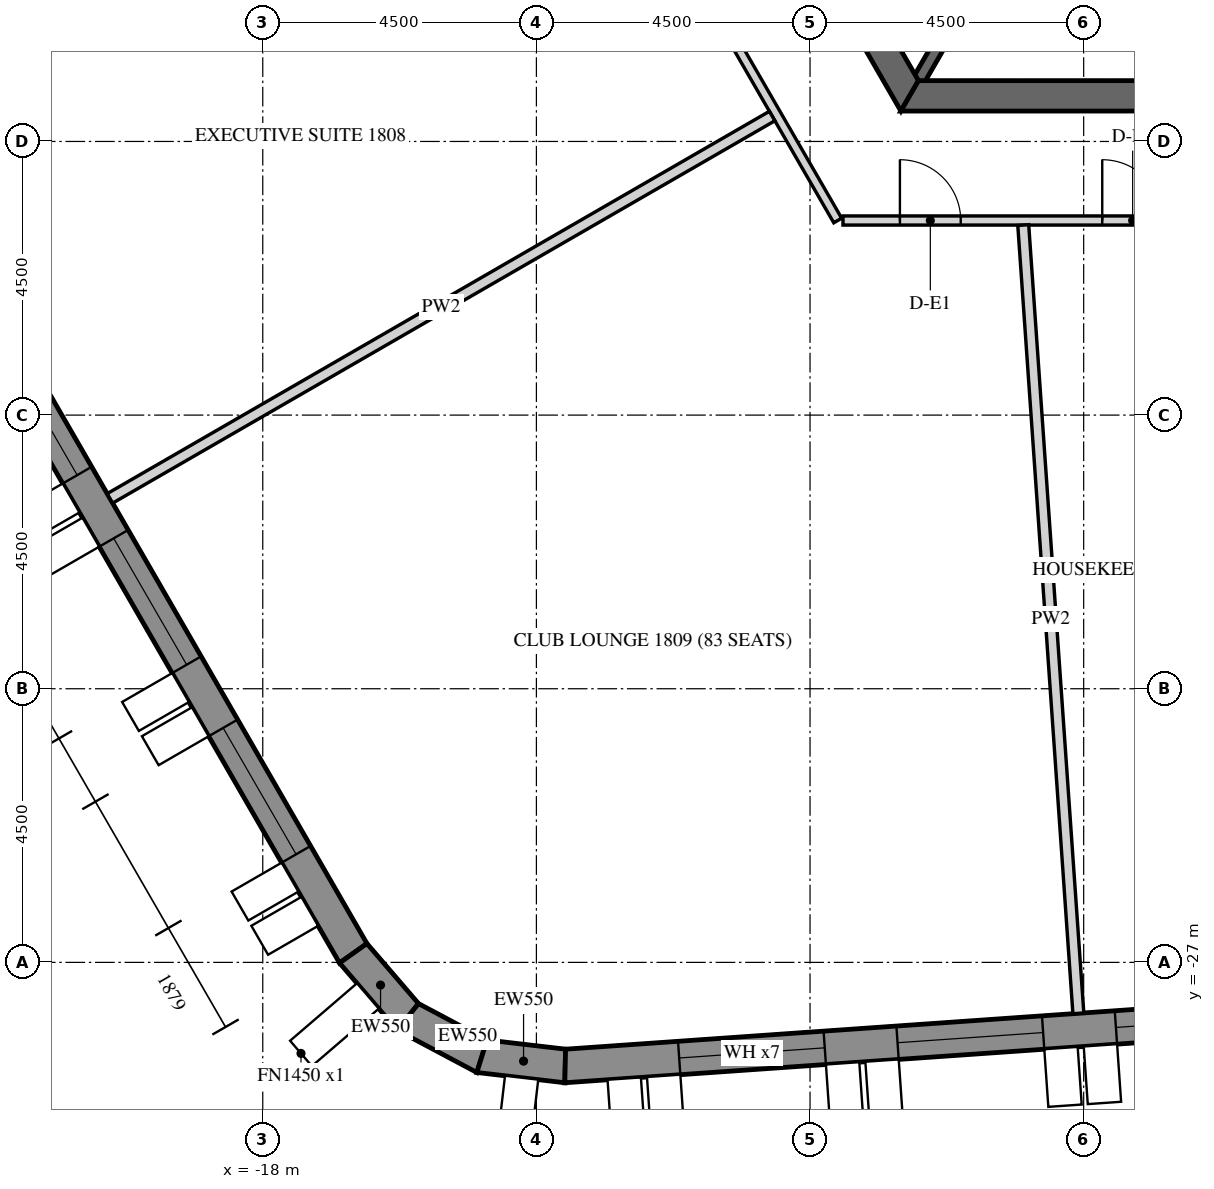
"""IFC4 building model, lengths in metres.
Left out: names, types, materials, properties, quantities, classifications, styles, units other than length and angle.
Written with IfcOpenShell. Run it as: python <this file> out.ifc"""

import sys

from ifc_helpers import new_model, si_unit, direction, frame, frame_2d, origin, place, context, subcontext, project, spatial, polyline, rectangle, outline, extrude, element, fill, save


model = new_model("IFC4")
c1 = context("Model", 3, precision=1e-05, world=origin(), true_north=direction((0.0, 1.0)))
c2 = subcontext(c1, "Body", "Model", "MODEL_VIEW")
j1 = project(units=[si_unit("LENGTHUNIT", "METRE"), si_unit("PLANEANGLEUNIT", "RADIAN")], contexts=[c1])
p1 = place(None, origin())
s1 = spatial("IfcSite", under=j1, at=p1, CompositionType="ELEMENT")
p2 = place(p1, origin())
s2 = spatial("IfcBuilding", under=s1, at=p2, CompositionType="ELEMENT")
p3 = place(p2, frame((0.0, 0.0, 226.8)))
s3 = spatial("IfcBuildingStorey", under=s2, at=p3, CompositionType="ELEMENT", Elevation=226.8)
p4 = place(p3, frame((-30.391, -2.811, -0.15), z_axis=(0.0, 0.0, 1.0), x_axis=(0.499998569178, -0.866026229868, 0.0)))
e1 = element("IfcWall", 1, at=p4, inside=s3, PredefinedType="SOLIDWALL", context=c2, shape_type="SweptSolid", body=[
    extrude(outline(polyline([(-0.022, -0.275), (27.783, -0.275), (27.732, 0.275), (0.022, 0.275), (-0.022, -0.275)])), origin(), (0.0, 0.0, 1.0), 3.9),
])
p5 = place(p4, frame((1.879, 0.0, 1.05)))
e2 = element("IfcOpeningElement", 2, at=p5, cuts=e1, PredefinedType="OPENING", context=c2, shape_type="SweptSolid", body=[
    extrude(rectangle(XDim=2.4, YDim=2.4, at=frame_2d((1.2, 1.2))), frame((0.0, 0.285, 0.0), z_axis=(0.0, -1.0, 0.0), x_axis=(1.0, 0.0, 0.0)), (0.0, 0.0, 1.0), 0.57),
])
p6 = place(p4, frame((5.479, 0.0, 1.05)))
e3 = element("IfcOpeningElement", 3, at=p6, cuts=e1, PredefinedType="OPENING", context=c2, shape_type="SweptSolid", body=[
    extrude(rectangle(XDim=2.4, YDim=2.4, at=frame_2d((1.2, 1.2))), frame((0.0, 0.285, 0.0), z_axis=(0.0, -1.0, 0.0), x_axis=(1.0, 0.0, 0.0)), (0.0, 0.0, 1.0), 0.57),
])
p7 = place(p4, frame((9.079, 0.0, 1.05)))
e4 = element("IfcOpeningElement", 4, at=p7, cuts=e1, PredefinedType="OPENING", context=c2, shape_type="SweptSolid", body=[
    extrude(rectangle(XDim=2.4, YDim=2.4, at=frame_2d((1.2, 1.2))), frame((0.0, 0.285, 0.0), z_axis=(0.0, -1.0, 0.0), x_axis=(1.0, 0.0, 0.0)), (0.0, 0.0, 1.0), 0.57),
])
p8 = place(p4, frame((12.679, 0.0, 1.05)))
e5 = element("IfcOpeningElement", 5, at=p8, cuts=e1, PredefinedType="OPENING", context=c2, shape_type="SweptSolid", body=[
    extrude(rectangle(XDim=2.4, YDim=2.4, at=frame_2d((1.2, 1.2))), frame((0.0, 0.285, 0.0), z_axis=(0.0, -1.0, 0.0), x_axis=(1.0, 0.0, 0.0)), (0.0, 0.0, 1.0), 0.57),
])
p9 = place(p4, frame((16.279, 0.0, 1.05)))
e6 = element("IfcOpeningElement", 6, at=p9, cuts=e1, PredefinedType="OPENING", context=c2, shape_type="SweptSolid", body=[
    extrude(rectangle(XDim=2.4, YDim=2.4, at=frame_2d((1.2, 1.2))), frame((0.0, 0.285, 0.0), z_axis=(0.0, -1.0, 0.0), x_axis=(1.0, 0.0, 0.0)), (0.0, 0.0, 1.0), 0.57),
])
p10 = place(p4, frame((19.879, 0.0, 1.05)))
e7 = element("IfcOpeningElement", 7, at=p10, cuts=e1, PredefinedType="OPENING", context=c2, shape_type="SweptSolid", body=[
    extrude(rectangle(XDim=2.4, YDim=2.4, at=frame_2d((1.2, 1.2))), frame((0.0, 0.285, 0.0), z_axis=(0.0, -1.0, 0.0), x_axis=(1.0, 0.0, 0.0)), (0.0, 0.0, 1.0), 0.57),
])
p11 = place(p4, frame((23.479, 0.0, 1.05)))
e8 = element("IfcOpeningElement", 8, at=p11, cuts=e1, PredefinedType="OPENING", context=c2, shape_type="SweptSolid", body=[
    extrude(rectangle(XDim=2.4, YDim=2.4, at=frame_2d((1.2, 1.2))), frame((0.0, 0.285, 0.0), z_axis=(0.0, -1.0, 0.0), x_axis=(1.0, 0.0, 0.0)), (0.0, 0.0, 1.0), 0.57),
])
p12 = place(p3, frame((-16.512, -26.85, -0.15), z_axis=(0.0, 0.0, 1.0), x_axis=(0.651621950847, -0.758543890078, 0.0)))
e9 = element("IfcWall", 9, at=p12, inside=s3, PredefinedType="SOLIDWALL", context=c2, shape_type="SweptSolid", body=[
    extrude(outline(polyline([(-0.026, -0.275), (1.431, -0.275), (1.327, 0.275), (0.026, 0.275), (-0.026, -0.275)])), origin(), (0.0, 0.0, 1.0), 3.9),
])
p13 = place(p3, frame((-15.614, -27.896, -0.15), z_axis=(0.0, 0.0, 1.0), x_axis=(0.882994189209, -0.469383917304, 0.0)))
e10 = element("IfcWall", 10, at=p13, inside=s3, PredefinedType="SOLIDWALL", context=c2, shape_type="SweptSolid", body=[
    extrude(outline(polyline([(-0.052, -0.275), (1.431, -0.275), (1.327, 0.275), (0.052, 0.275), (-0.052, -0.275)])), origin(), (0.0, 0.0, 1.0), 3.9),
])
p14 = place(p3, frame((-14.396, -28.543, -0.15), z_axis=(0.0, 0.0, 1.0), x_axis=(0.993232537394, -0.11614269956, 0.0)))
e11 = element("IfcWall", 11, at=p14, inside=s3, PredefinedType="SOLIDWALL", context=c2, shape_type="SweptSolid", body=[
    extrude(outline(polyline([(-0.052, -0.275), (1.405, -0.275), (1.353, 0.275), (0.052, 0.275), (-0.052, -0.275)])), origin(), (0.0, 0.0, 1.0), 3.9),
])
p15 = place(p3, frame((-13.026, -28.704, -0.15), z_axis=(0.0, 0.0, 1.0), x_axis=(0.99756406806, 0.069756219185, 0.0)))
e12 = element("IfcWall", 12, at=p15, inside=s3, PredefinedType="SOLIDWALL", context=c2, shape_type="SweptSolid", body=[
    extrude(outline(polyline([(-0.026, -0.275), (27.78, -0.275), (27.735, 0.275), (0.026, 0.275), (-0.026, -0.275)])), origin(), (0.0, 0.0, 1.0), 3.9),
])
p16 = place(p15, frame((1.879, 0.0, 1.05)))
e13 = element("IfcOpeningElement", 13, at=p16, cuts=e12, PredefinedType="OPENING", context=c2, shape_type="SweptSolid", body=[
    extrude(rectangle(XDim=2.4, YDim=2.4, at=frame_2d((1.2, 1.2))), frame((0.0, 0.285, 0.0), z_axis=(0.0, -1.0, 0.0), x_axis=(1.0, 0.0, 0.0)), (0.0, 0.0, 1.0), 0.57),
])
p17 = place(p15, frame((5.479, 0.0, 1.05)))
e14 = element("IfcOpeningElement", 14, at=p17, cuts=e12, PredefinedType="OPENING", context=c2, shape_type="SweptSolid", body=[
    extrude(rectangle(XDim=2.4, YDim=2.4, at=frame_2d((1.2, 1.2))), frame((0.0, 0.285, 0.0), z_axis=(0.0, -1.0, 0.0), x_axis=(1.0, 0.0, 0.0)), (0.0, 0.0, 1.0), 0.57),
])
p18 = place(p15, frame((9.079, 0.0, 1.05)))
e15 = element("IfcOpeningElement", 15, at=p18, cuts=e12, PredefinedType="OPENING", context=c2, shape_type="SweptSolid", body=[
    extrude(rectangle(XDim=2.4, YDim=2.4, at=frame_2d((1.2, 1.2))), frame((0.0, 0.285, 0.0), z_axis=(0.0, -1.0, 0.0), x_axis=(1.0, 0.0, 0.0)), (0.0, 0.0, 1.0), 0.57),
])
p19 = place(p15, frame((12.679, 0.0, 1.05)))
e16 = element("IfcOpeningElement", 16, at=p19, cuts=e12, PredefinedType="OPENING", context=c2, shape_type="SweptSolid", body=[
    extrude(rectangle(XDim=2.4, YDim=2.4, at=frame_2d((1.2, 1.2))), frame((0.0, 0.285, 0.0), z_axis=(0.0, -1.0, 0.0), x_axis=(1.0, 0.0, 0.0)), (0.0, 0.0, 1.0), 0.57),
])
p20 = place(p15, frame((16.279, 0.0, 1.05)))
e17 = element("IfcOpeningElement", 17, at=p20, cuts=e12, PredefinedType="OPENING", context=c2, shape_type="SweptSolid", body=[
    extrude(rectangle(XDim=2.4, YDim=2.4, at=frame_2d((1.2, 1.2))), frame((0.0, 0.285, 0.0), z_axis=(0.0, -1.0, 0.0), x_axis=(1.0, 0.0, 0.0)), (0.0, 0.0, 1.0), 0.57),
])
p21 = place(p15, frame((19.879, 0.0, 1.05)))
e18 = element("IfcOpeningElement", 18, at=p21, cuts=e12, PredefinedType="OPENING", context=c2, shape_type="SweptSolid", body=[
    extrude(rectangle(XDim=2.4, YDim=2.4, at=frame_2d((1.2, 1.2))), frame((0.0, 0.285, 0.0), z_axis=(0.0, -1.0, 0.0), x_axis=(1.0, 0.0, 0.0)), (0.0, 0.0, 1.0), 0.57),
])
p22 = place(p15, frame((23.479, 0.0, 1.05)))
e19 = element("IfcOpeningElement", 19, at=p22, cuts=e12, PredefinedType="OPENING", context=c2, shape_type="SweptSolid", body=[
    extrude(rectangle(XDim=2.4, YDim=2.4, at=frame_2d((1.2, 1.2))), frame((0.0, 0.285, 0.0), z_axis=(0.0, -1.0, 0.0), x_axis=(1.0, 0.0, 0.0)), (0.0, 0.0, 1.0), 0.57),
])
p23 = place(p3, frame((-14.722, 0.0, -0.15), z_axis=(0.0, 0.0, 1.0), x_axis=(0.50000571537, -0.866022103989, 0.0)))
e20 = element("IfcWall", 20, at=p23, inside=s3, PredefinedType="SHEAR", context=c2, shape_type="SweptSolid", body=[
    extrude(outline(polyline([(-0.144, -0.25), (14.867, -0.25), (14.578, 0.25), (0.144, 0.25), (-0.144, -0.25)])), origin(), (0.0, 0.0, 1.0), 3.9),
])
p24 = place(p23, frame((6.432, 0.0, 0.15)))
e21 = element("IfcOpeningElement", 21, at=p24, cuts=e20, PredefinedType="OPENING", context=c2, shape_type="SweptSolid", body=[
    extrude(rectangle(XDim=1.8, YDim=2.4, at=frame_2d((0.9, 1.2))), frame((0.0, 0.26, 0.0), z_axis=(0.0, -1.0, 0.0), x_axis=(1.0, 0.0, 0.0)), (0.0, 0.0, 1.0), 0.52),
])
p25 = place(p3, frame((-7.361, -12.75, -0.15), z_axis=(0.0, 0.0, 1.0), x_axis=(1.0, 0.0, 0.0)))
e22 = element("IfcWall", 22, at=p25, inside=s3, PredefinedType="SHEAR", context=c2, shape_type="SweptSolid", body=[
    extrude(outline(polyline([(-0.144, -0.25), (14.866, -0.25), (14.578, 0.25), (0.144, 0.25), (-0.144, -0.25)])), origin(), (0.0, 0.0, 1.0), 3.9),
])
p26 = place(p25, frame((6.761, 0.0, 0.15)))
e23 = element("IfcOpeningElement", 23, at=p26, cuts=e22, PredefinedType="OPENING", context=c2, shape_type="SweptSolid", body=[
    extrude(rectangle(XDim=1.2, YDim=2.4, at=frame_2d((0.6, 1.2))), frame((0.0, 0.26, 0.0), z_axis=(0.0, -1.0, 0.0), x_axis=(1.0, 0.0, 0.0)), (0.0, 0.0, 1.0), 0.52),
])
p27 = place(p3, frame((-5.773, -10.0, -0.15), z_axis=(0.0, 0.0, 1.0), x_axis=(-0.499995765644, -0.866027848477, 0.0)))
e24 = element("IfcWall", 24, at=p27, inside=s3, PredefinedType="SHEAR", context=c2, shape_type="SweptSolid", body=[
    extrude(rectangle(XDim=2.887, YDim=0.2, at=frame_2d((1.443, 0.0))), origin(), (0.0, 0.0, 1.0), 3.9),
])
p28 = place(p3, frame((-15.863, -2.125, 0.0), z_axis=(0.0, 0.0, 1.0), x_axis=(0.500008833422, -0.866020303746, 0.0)))
e25 = element("IfcWall", 25, at=p28, inside=s3, PredefinedType="PARTITIONING", context=c2, shape_type="SweptSolid", body=[
    extrude(rectangle(XDim=14.636, YDim=0.15, at=frame_2d((7.318, 0.0))), origin(), (0.0, 0.0, 1.0), 2.988),
])
p29 = place(p28, frame((0.861, 0.0, 0.0)))
e26 = element("IfcOpeningElement", 26, at=p29, cuts=e25, PredefinedType="OPENING", context=c2, shape_type="SweptSolid", body=[
    extrude(rectangle(XDim=1.0, YDim=2.1, at=frame_2d((0.5, 1.05))), frame((0.0, 0.085, 0.0), z_axis=(0.0, -1.0, 0.0), x_axis=(1.0, 0.0, 0.0)), (0.0, 0.0, 1.0), 0.17),
])
p30 = place(p28, frame((9.909, 0.0, 0.0)))
e27 = element("IfcOpeningElement", 27, at=p30, cuts=e25, PredefinedType="OPENING", context=c2, shape_type="SweptSolid", body=[
    extrude(rectangle(XDim=1.0, YDim=2.1, at=frame_2d((0.5, 1.05))), frame((0.0, 0.085, 0.0), z_axis=(0.0, -1.0, 0.0), x_axis=(1.0, 0.0, 0.0)), (0.0, 0.0, 1.0), 0.17),
])
p31 = place(p3, frame((-8.458, -14.8, 0.0), z_axis=(0.0, 0.0, 1.0), x_axis=(1.0, 0.0, 0.0)))
e28 = element("IfcWall", 28, at=p31, inside=s3, PredefinedType="PARTITIONING", context=c2, shape_type="SweptSolid", body=[
    extrude(rectangle(XDim=14.636, YDim=0.15, at=frame_2d((7.318, 0.0))), origin(), (0.0, 0.0, 1.0), 2.988),
])
p32 = place(p31, frame((0.936, 0.0, 0.0)))
e29 = element("IfcOpeningElement", 29, at=p32, cuts=e28, PredefinedType="OPENING", context=c2, shape_type="SweptSolid", body=[
    extrude(rectangle(XDim=1.0, YDim=2.1, at=frame_2d((0.5, 1.05))), frame((0.0, 0.085, 0.0), z_axis=(0.0, -1.0, 0.0), x_axis=(1.0, 0.0, 0.0)), (0.0, 0.0, 1.0), 0.17),
])
p33 = place(p31, frame((4.264, 0.0, 0.0)))
e30 = element("IfcOpeningElement", 30, at=p33, cuts=e28, PredefinedType="OPENING", context=c2, shape_type="SweptSolid", body=[
    extrude(rectangle(XDim=1.0, YDim=2.1, at=frame_2d((0.5, 1.05))), frame((0.0, 0.085, 0.0), z_axis=(0.0, -1.0, 0.0), x_axis=(1.0, 0.0, 0.0)), (0.0, 0.0, 1.0), 0.17),
])
p34 = place(p31, frame((7.872, 0.0, 0.0)))
e31 = element("IfcOpeningElement", 31, at=p34, cuts=e28, PredefinedType="OPENING", context=c2, shape_type="SweptSolid", body=[
    extrude(rectangle(XDim=1.0, YDim=2.1, at=frame_2d((0.5, 1.05))), frame((0.0, 0.085, 0.0), z_axis=(0.0, -1.0, 0.0), x_axis=(1.0, 0.0, 0.0)), (0.0, 0.0, 1.0), 0.17),
])
p35 = place(p31, frame((11.481, 0.0, 0.0)))
e32 = element("IfcOpeningElement", 32, at=p35, cuts=e28, PredefinedType="OPENING", context=c2, shape_type="SweptSolid", body=[
    extrude(rectangle(XDim=1.0, YDim=2.1, at=frame_2d((0.5, 1.05))), frame((0.0, 0.085, 0.0), z_axis=(0.0, -1.0, 0.0), x_axis=(1.0, 0.0, 0.0)), (0.0, 0.0, 1.0), 0.17),
])
p36 = place(p3, frame((-24.114, -13.134, 0.0), z_axis=(0.0, 0.0, 1.0), x_axis=(0.866024255907, 0.500001988177, 0.0)))
e33 = element("IfcWall", 33, at=p36, inside=s3, PredefinedType="PARTITIONING", context=c2, shape_type="SweptSolid", body=[
    extrude(rectangle(XDim=12.575, YDim=0.18, at=frame_2d((6.288, 0.0))), origin(), (0.0, 0.0, 1.0), 2.988),
])
p37 = place(p3, frame((-20.513, -19.37, 0.0), z_axis=(0.0, 0.0, 1.0), x_axis=(0.866019402111, 0.500010395058, 0.0)))
e34 = element("IfcWall", 34, at=p37, inside=s3, PredefinedType="PARTITIONING", context=c2, shape_type="SweptSolid", body=[
    extrude(rectangle(XDim=12.575, YDim=0.18, at=frame_2d((6.288, 0.0))), origin(), (0.0, 0.0, 1.0), 2.988),
])
p38 = place(p3, frame((-4.587, -27.838, 0.0), z_axis=(0.0, 0.0, 1.0), x_axis=(-0.069759577234, 0.997563833238, 0.0)))
e35 = element("IfcWall", 35, at=p38, inside=s3, PredefinedType="PARTITIONING", context=c2, shape_type="SweptSolid", body=[
    extrude(rectangle(XDim=12.995, YDim=0.18, at=frame_2d((6.497, 0.0))), origin(), (0.0, 0.0, 1.0), 2.988),
])
p39 = place(p9, frame((0.0, 0.205, 0.0)))
e36 = element("IfcWindow", 36, at=p39, inside=s3, PartitioningType="DOUBLE_PANEL_VERTICAL", PredefinedType="WINDOW", context=c2, shape_type="SweptSolid", body=[
    extrude(rectangle(XDim=2.4, YDim=2.4, at=frame_2d((1.2, 1.2))), frame((0.0, 0.03, 0.0), z_axis=(0.0, -1.0, 0.0), x_axis=(1.0, 0.0, 0.0)), (0.0, 0.0, 1.0), 0.06),
])
fill(e6, e36)
p40 = place(p10, frame((0.0, 0.205, 0.0)))
e37 = element("IfcWindow", 37, at=p40, inside=s3, PartitioningType="DOUBLE_PANEL_VERTICAL", PredefinedType="WINDOW", context=c2, shape_type="SweptSolid", body=[
    extrude(rectangle(XDim=2.4, YDim=2.4, at=frame_2d((1.2, 1.2))), frame((0.0, 0.03, 0.0), z_axis=(0.0, -1.0, 0.0), x_axis=(1.0, 0.0, 0.0)), (0.0, 0.0, 1.0), 0.06),
])
fill(e7, e37)
p41 = place(p11, frame((0.0, 0.205, 0.0)))
e38 = element("IfcWindow", 38, at=p41, inside=s3, PartitioningType="DOUBLE_PANEL_VERTICAL", PredefinedType="WINDOW", context=c2, shape_type="SweptSolid", body=[
    extrude(rectangle(XDim=2.4, YDim=2.4, at=frame_2d((1.2, 1.2))), frame((0.0, 0.03, 0.0), z_axis=(0.0, -1.0, 0.0), x_axis=(1.0, 0.0, 0.0)), (0.0, 0.0, 1.0), 0.06),
])
fill(e8, e38)
p42 = place(p16, frame((0.0, 0.205, 0.0)))
e39 = element("IfcWindow", 39, at=p42, inside=s3, PartitioningType="DOUBLE_PANEL_VERTICAL", PredefinedType="WINDOW", context=c2, shape_type="SweptSolid", body=[
    extrude(rectangle(XDim=2.4, YDim=2.4, at=frame_2d((1.2, 1.2))), frame((0.0, 0.03, 0.0), z_axis=(0.0, -1.0, 0.0), x_axis=(1.0, 0.0, 0.0)), (0.0, 0.0, 1.0), 0.06),
])
fill(e13, e39)
p43 = place(p17, frame((0.0, 0.205, 0.0)))
e40 = element("IfcWindow", 40, at=p43, inside=s3, PartitioningType="DOUBLE_PANEL_VERTICAL", PredefinedType="WINDOW", context=c2, shape_type="SweptSolid", body=[
    extrude(rectangle(XDim=2.4, YDim=2.4, at=frame_2d((1.2, 1.2))), frame((0.0, 0.03, 0.0), z_axis=(0.0, -1.0, 0.0), x_axis=(1.0, 0.0, 0.0)), (0.0, 0.0, 1.0), 0.06),
])
fill(e14, e40)
p44 = place(p18, frame((0.0, 0.205, 0.0)))
e41 = element("IfcWindow", 41, at=p44, inside=s3, PartitioningType="DOUBLE_PANEL_VERTICAL", PredefinedType="WINDOW", context=c2, shape_type="SweptSolid", body=[
    extrude(rectangle(XDim=2.4, YDim=2.4, at=frame_2d((1.2, 1.2))), frame((0.0, 0.03, 0.0), z_axis=(0.0, -1.0, 0.0), x_axis=(1.0, 0.0, 0.0)), (0.0, 0.0, 1.0), 0.06),
])
fill(e15, e41)
p45 = place(p32, origin())
e42 = element("IfcDoor", 42, at=p45, inside=s3, OperationType="SINGLE_SWING_RIGHT", PredefinedType="DOOR", context=c2, shape_type="SweptSolid", body=[
    extrude(rectangle(XDim=1.0, YDim=2.1, at=frame_2d((0.5, 1.05))), frame((0.0, 0.025, 0.0), z_axis=(0.0, -1.0, 0.0), x_axis=(1.0, 0.0, 0.0)), (0.0, 0.0, 1.0), 0.05),
])
fill(e29, e42)
p46 = place(p33, origin())
e43 = element("IfcDoor", 43, at=p46, inside=s3, OperationType="SINGLE_SWING_RIGHT", PredefinedType="DOOR", context=c2, shape_type="SweptSolid", body=[
    extrude(rectangle(XDim=1.0, YDim=2.1, at=frame_2d((0.5, 1.05))), frame((0.0, 0.025, 0.0), z_axis=(0.0, -1.0, 0.0), x_axis=(1.0, 0.0, 0.0)), (0.0, 0.0, 1.0), 0.05),
])
fill(e30, e43)
save(model, sys.argv[1])
